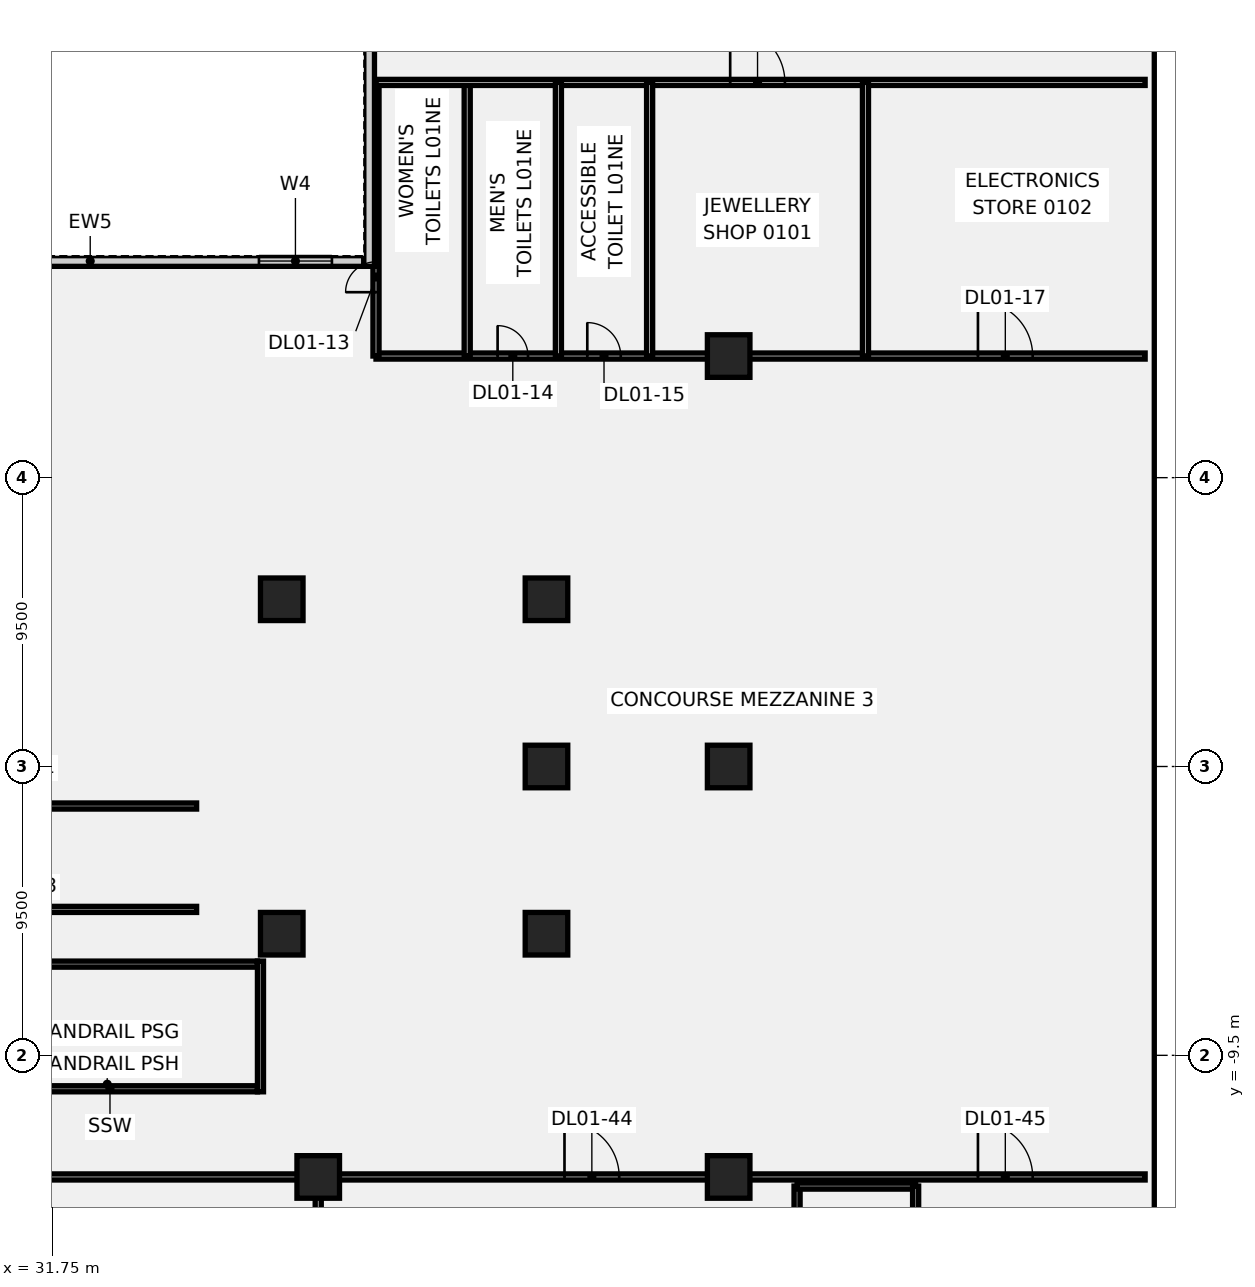
"""IFC4 building model, lengths in metres.
Left out: names, types, materials, properties, quantities, classifications, styles, units other than length and angle.
Written with IfcOpenShell. Run it as: python <this file> out.ifc"""

import sys

from ifc_helpers import new_model, si_unit, direction, frame, frame_2d, origin, origin_2d, place, context, subcontext, project, spatial, polyline, rectangle, outline, extrude, element, fill, save


model = new_model("IFC4")
c1 = context("Model", 3, precision=1e-05, world=origin(), true_north=direction((0.0, 1.0)))
c2 = subcontext(c1, "Body", "Model", "MODEL_VIEW")
j1 = project(units=[si_unit("LENGTHUNIT", "METRE"), si_unit("PLANEANGLEUNIT", "RADIAN")], contexts=[c1])
p1 = place(None, origin())
s1 = spatial("IfcSite", under=j1, at=p1, CompositionType="ELEMENT")
p2 = place(p1, origin())
s2 = spatial("IfcBuilding", under=s1, at=p2, CompositionType="ELEMENT")
p3 = place(p2, frame((0.0, 0.0, 9.0)))
s3 = spatial("IfcBuildingStorey", under=s2, at=p3, CompositionType="ELEMENT", Elevation=9.0)
for number, where, z_axis, x_axis in (
    (1, (39.3, 5.5, -0.5), (0.0, 0.0, 1.0), (1.0, 0.0, 0.0)),
    (2, (39.3, -5.5, -0.5), (0.0, 0.0, 1.0), (1.0, 0.0, 0.0)),
    (3, (48.008, -5.5, -0.5), (0.0, 0.0, 1.0), (1.0, 0.0, 0.0)),
    (4, (48.008, 0.0, -0.5), (0.0, 0.0, 1.0), (1.0, 0.0, 0.0)),
    (5, (48.008, 5.5, -0.5), (0.0, 0.0, 1.0), (1.0, 0.0, 0.0)),
    (6, (40.5, -13.5, -0.5), (0.0, 0.0, 1.0), (1.0, 0.0, 0.0)),
    (7, (54.0, -13.5, -0.5), (0.0, 0.0, 1.0), (1.0, 0.0, 0.0)),
    (8, (54.0, 0.0, -0.5), (0.0, 0.0, 1.0), (1.0, 0.0, 0.0)),
    (9, (54.0, 13.5, -0.5), (0.0, 0.0, 1.0), (1.0, 0.0, 0.0)),
):
    element("IfcColumn", number, at=place(p3, frame(where, z_axis=z_axis, x_axis=x_axis)), inside=s3, PredefinedType="COLUMN", context=c2, shape_type="SweptSolid", body=[
        extrude(rectangle(XDim=1.4, YDim=1.4, at=origin_2d()), origin(), (0.0, 0.0, 1.0), 6.0),
    ])
p4 = place(p3, frame((56.25, -25.3, 0.0), z_axis=(0.0, 0.0, 1.0), x_axis=(0.0, 1.0, 0.0)))
e10 = element("IfcWall", 10, at=p4, inside=s3, PredefinedType="PARTITIONING", context=c2, shape_type="SweptSolid", body=[
    extrude(rectangle(XDim=11.5, YDim=0.2, at=frame_2d((5.75, 0.0))), origin(), (0.0, 0.0, 1.0), 5.5),
])
p5 = place(p3, frame((56.25, -13.8, 0.0), z_axis=(0.0, 0.0, 1.0), x_axis=(1.0, 0.0, 0.0)))
e11 = element("IfcWall", 11, at=p5, inside=s3, PredefinedType="PARTITIONING", context=c2, shape_type="SweptSolid", body=[
    extrude(rectangle(XDim=3.9, YDim=0.2, at=frame_2d((1.95, 0.0))), origin(), (0.0, 0.0, 1.0), 5.5),
])
p6 = place(p3, frame((60.15, -25.3, 0.0), z_axis=(0.0, 0.0, 1.0), x_axis=(0.0, 1.0, 0.0)))
e12 = element("IfcWall", 12, at=p6, inside=s3, PredefinedType="PARTITIONING", context=c2, shape_type="SweptSolid", body=[
    extrude(rectangle(XDim=11.5, YDim=0.2, at=frame_2d((5.75, 0.0))), origin(), (0.0, 0.0, 1.0), 5.5),
])
p7 = place(p3, frame((40.5, -22.5, 0.0), z_axis=(0.0, 0.0, 1.0), x_axis=(0.0, 1.0, 0.0)))
e13 = element("IfcWall", 13, at=p7, inside=s3, PredefinedType="PARTITIONING", context=c2, shape_type="SweptSolid", body=[
    extrude(rectangle(XDim=9.0, YDim=0.2, at=frame_2d((4.5, 0.0))), origin(), (0.0, 0.0, 1.0), 5.5),
])
p8 = place(p3, frame((22.5, -13.5, 0.0), z_axis=(0.0, 0.0, 1.0), x_axis=(1.0, 0.0, 0.0)))
e14 = element("IfcWall", 14, at=p8, inside=s3, PredefinedType="PARTITIONING", context=c2, shape_type="SweptSolid", body=[
    extrude(rectangle(XDim=45.199, YDim=0.2, at=frame_2d((22.6, 0.0))), origin(), (0.0, 0.0, 1.0), 5.5),
])
p9 = place(p8, frame((26.1, 0.0, 0.0)))
e15 = element("IfcOpeningElement", 15, at=p9, cuts=e14, PredefinedType="OPENING", context=c2, shape_type="SweptSolid", body=[
    extrude(rectangle(XDim=1.8, YDim=2.1, at=frame_2d((0.9, 1.05))), frame((0.0, 0.11, 0.0), z_axis=(0.0, -1.0, 0.0), x_axis=(1.0, 0.0, 0.0)), (0.0, 0.0, 1.0), 0.22),
])
p10 = place(p8, frame((39.7, 0.0, 0.0)))
e16 = element("IfcOpeningElement", 16, at=p10, cuts=e14, PredefinedType="OPENING", context=c2, shape_type="SweptSolid", body=[
    extrude(rectangle(XDim=1.8, YDim=2.1, at=frame_2d((0.9, 1.05))), frame((0.0, 0.11, 0.0), z_axis=(0.0, -1.0, 0.0), x_axis=(1.0, 0.0, 0.0)), (0.0, 0.0, 1.0), 0.22),
])
p11 = place(p3, frame((42.4, 13.5, 0.0), z_axis=(0.0, 0.0, 1.0), x_axis=(1.0, 0.0, 0.0)))
e17 = element("IfcWall", 17, at=p11, inside=s3, PredefinedType="PARTITIONING", context=c2, shape_type="SweptSolid", body=[
    extrude(rectangle(XDim=25.299, YDim=0.2, at=frame_2d((12.649, 0.0))), origin(), (0.0, 0.0, 1.0), 5.5),
])
p12 = place(p11, frame((4.0, 0.0, 0.0)))
e18 = element("IfcOpeningElement", 18, at=p12, cuts=e17, PredefinedType="OPENING", context=c2, shape_type="SweptSolid", body=[
    extrude(rectangle(XDim=1.0, YDim=2.1, at=frame_2d((0.5, 1.05))), frame((0.0, 0.11, 0.0), z_axis=(0.0, -1.0, 0.0), x_axis=(1.0, 0.0, 0.0)), (0.0, 0.0, 1.0), 0.22),
])
p13 = place(p11, frame((6.95, 0.0, 0.0)))
e19 = element("IfcOpeningElement", 19, at=p13, cuts=e17, PredefinedType="OPENING", context=c2, shape_type="SweptSolid", body=[
    extrude(rectangle(XDim=1.1, YDim=2.1, at=frame_2d((0.55, 1.05))), frame((0.0, 0.11, 0.0), z_axis=(0.0, -1.0, 0.0), x_axis=(1.0, 0.0, 0.0)), (0.0, 0.0, 1.0), 0.22),
])
p14 = place(p11, frame((19.8, 0.0, 0.0)))
e20 = element("IfcOpeningElement", 20, at=p14, cuts=e17, PredefinedType="OPENING", context=c2, shape_type="SweptSolid", body=[
    extrude(rectangle(XDim=1.8, YDim=2.1, at=frame_2d((0.9, 1.05))), frame((0.0, 0.11, 0.0), z_axis=(0.0, -1.0, 0.0), x_axis=(1.0, 0.0, 0.0)), (0.0, 0.0, 1.0), 0.22),
])
p15 = place(p3, frame((45.4, 13.5, 0.0), z_axis=(0.0, 0.0, 1.0), x_axis=(0.0, 1.0, 0.0)))
e21 = element("IfcWall", 21, at=p15, inside=s3, PredefinedType="PARTITIONING", context=c2, shape_type="SweptSolid", body=[
    extrude(rectangle(XDim=9.0, YDim=0.2, at=frame_2d((4.5, 0.0))), origin(), (0.0, 0.0, 1.0), 5.5),
])
p16 = place(p3, frame((42.4, 13.5, 0.0), z_axis=(0.0, 0.0, 1.0), x_axis=(0.0, 1.0, 0.0)))
e22 = element("IfcWall", 22, at=p16, inside=s3, PredefinedType="PARTITIONING", context=c2, shape_type="SweptSolid", body=[
    extrude(rectangle(XDim=9.0, YDim=0.2, at=frame_2d((4.5, 0.0))), origin(), (0.0, 0.0, 1.0), 5.5),
])
p17 = place(p16, frame((2.1, 0.0, 0.0)))
e23 = element("IfcOpeningElement", 23, at=p17, cuts=e22, PredefinedType="OPENING", context=c2, shape_type="SweptSolid", body=[
    extrude(rectangle(XDim=1.0, YDim=2.1, at=frame_2d((0.5, 1.05))), frame((0.0, 0.11, 0.0), z_axis=(0.0, -1.0, 0.0), x_axis=(1.0, 0.0, 0.0)), (0.0, 0.0, 1.0), 0.22),
])
p18 = place(p3, frame((42.4, 22.5, 0.0), z_axis=(0.0, 0.0, 1.0), x_axis=(1.0, 0.0, 0.0)))
e24 = element("IfcWall", 24, at=p18, inside=s3, PredefinedType="PARTITIONING", context=c2, shape_type="SweptSolid", body=[
    extrude(rectangle(XDim=25.299, YDim=0.2, at=frame_2d((12.649, 0.0))), origin(), (0.0, 0.0, 1.0), 5.5),
])
p19 = place(p18, frame((11.65, 0.0, 0.0)))
e25 = element("IfcOpeningElement", 25, at=p19, cuts=e24, PredefinedType="OPENING", context=c2, shape_type="SweptSolid", body=[
    extrude(rectangle(XDim=1.8, YDim=2.1, at=frame_2d((0.9, 1.05))), frame((0.0, 0.11, 0.0), z_axis=(0.0, -1.0, 0.0), x_axis=(1.0, 0.0, 0.0)), (0.0, 0.0, 1.0), 0.22),
])
for number, where, z_axis, x_axis in (
    (26, (48.4, 13.5, 0.0), (0.0, 0.0, 1.0), (0.0, 1.0, 0.0)),
    (27, (51.4, 13.5, 0.0), (0.0, 0.0, 1.0), (0.0, 1.0, 0.0)),
    (28, (58.5, 13.5, 0.0), (0.0, 0.0, 1.0), (0.0, 1.0, 0.0)),
):
    element("IfcWall", number, at=place(p3, frame(where, z_axis=z_axis, x_axis=x_axis)), inside=s3, PredefinedType="PARTITIONING", context=c2, shape_type="SweptSolid", body=[
        extrude(rectangle(XDim=9.0, YDim=0.2, at=frame_2d((4.5, 0.0))), origin(), (0.0, 0.0, 1.0), 5.5),
    ])
for number, where, z_axis, x_axis in (
    (29, (28.8, -10.6, 0.0), (0.0, 0.0, 1.0), (1.0, 0.0, 0.0)),
    (30, (28.8, -6.5, 0.0), (0.0, 0.0, 1.0), (1.0, 0.0, 0.0)),
):
    element("IfcWall", number, at=place(p3, frame(where, z_axis=z_axis, x_axis=x_axis)), inside=s3, PredefinedType="SOLIDWALL", context=c2, shape_type="SweptSolid", body=[
        extrude(rectangle(XDim=9.7, YDim=0.2, at=frame_2d((4.85, 0.0))), origin(), (0.0, 0.0, 1.0), 5.5),
    ])
p20 = place(p3, frame((38.6, -10.7, 0.0), z_axis=(0.0, 0.0, 1.0), x_axis=(0.0, 1.0, 0.0)))
e31 = element("IfcWall", 31, at=p20, inside=s3, PredefinedType="SOLIDWALL", context=c2, shape_type="SweptSolid", body=[
    extrude(rectangle(XDim=4.3, YDim=0.2, at=frame_2d((2.15, 0.0))), origin(), (0.0, 0.0, 1.0), 5.5),
])
p21 = place(p3, frame((24.0, 16.625, 0.0), z_axis=(0.0, 0.0, 1.0), x_axis=(1.0, 0.0, 0.0)))
e32 = element("IfcWall", 32, at=p21, inside=s3, PredefinedType="SOLIDWALL", context=c2, shape_type="SweptSolid", body=[
    extrude(rectangle(XDim=18.0, YDim=0.35, at=frame_2d((9.0, 0.0))), origin(), (0.0, 0.0, 1.0), 5.5),
])
p22 = place(p21, frame((14.55, 0.0, 1.0)))
e33 = element("IfcOpeningElement", 33, at=p22, cuts=e32, PredefinedType="OPENING", context=c2, shape_type="SweptSolid", body=[
    extrude(rectangle(XDim=2.4, YDim=1.8, at=frame_2d((1.2, 0.9))), frame((0.0, 0.185, 0.0), z_axis=(0.0, -1.0, 0.0), x_axis=(1.0, 0.0, 0.0)), (0.0, 0.0, 1.0), 0.37),
])
p23 = place(p3, frame((42.175, 16.45, 0.0), z_axis=(0.0, 0.0, 1.0), x_axis=(0.0, 1.0, 0.0)))
e34 = element("IfcWall", 34, at=p23, inside=s3, PredefinedType="SOLIDWALL", context=c2, shape_type="SweptSolid", body=[
    extrude(rectangle(XDim=27.4, YDim=0.35, at=frame_2d((13.7, 0.0))), origin(), (0.0, 0.0, 1.0), 5.5),
])
p24 = place(p23, frame((15.2, 0.0, 1.0)))
e35 = element("IfcOpeningElement", 35, at=p24, cuts=e34, PredefinedType="OPENING", context=c2, shape_type="SweptSolid", body=[
    extrude(rectangle(XDim=2.4, YDim=1.8, at=frame_2d((1.2, 0.9))), frame((0.0, 0.185, 0.0), z_axis=(0.0, -1.0, 0.0), x_axis=(1.0, 0.0, 0.0)), (0.0, 0.0, 1.0), 0.37),
])
p25 = place(p3, frame((29.8, -1.3, 0.0), z_axis=(0.0, 0.0, 1.0), x_axis=(1.0, 0.0, 0.0)))
e36 = element("IfcWall", 36, at=p25, inside=s3, PredefinedType="SHEAR", context=c2, shape_type="SweptSolid", body=[
    extrude(rectangle(XDim=6.7, YDim=0.2, at=frame_2d((3.35, 0.0))), origin(), (0.0, 0.0, 1.0), 5.5),
])
p26 = place(p25, frame((0.35, 0.0, 0.0)))
e37 = element("IfcOpeningElement", 37, at=p26, cuts=e36, PredefinedType="OPENING", context=c2, shape_type="SweptSolid", body=[
    extrude(rectangle(XDim=1.0, YDim=2.1, at=frame_2d((0.5, 1.05))), frame((0.0, 0.11, 0.0), z_axis=(0.0, -1.0, 0.0), x_axis=(1.0, 0.0, 0.0)), (0.0, 0.0, 1.0), 0.22),
])
p27 = place(p3, frame((29.8, -4.7, 0.0), z_axis=(0.0, 0.0, 1.0), x_axis=(1.0, 0.0, 0.0)))
e38 = element("IfcWall", 38, at=p27, inside=s3, PredefinedType="SHEAR", context=c2, shape_type="SweptSolid", body=[
    extrude(rectangle(XDim=6.7, YDim=0.2, at=frame_2d((3.35, 0.0))), origin(), (0.0, 0.0, 1.0), 5.5),
])
p28 = place(p3, origin())
e39 = element("IfcWall", 39, at=p28, inside=s3, PredefinedType="SHEAR", context=c2, shape_type="SweptSolid", body=[
    extrude(outline(polyline([(36.3, -4.6), (36.5, -4.6), (36.5, -1.4), (36.3, -1.4), (36.3, -4.6)])), origin(), (0.0, 0.0, 1.0), 5.5),
])
p29 = place(p17, origin())
e40 = element("IfcDoor", 40, at=p29, inside=s3, OperationType="SINGLE_SWING_LEFT", PredefinedType="DOOR", context=c2, shape_type="SweptSolid", body=[
    extrude(rectangle(XDim=1.0, YDim=2.1, at=frame_2d((0.5, 1.05))), frame((0.0, 0.025, 0.0), z_axis=(0.0, -1.0, 0.0), x_axis=(1.0, 0.0, 0.0)), (0.0, 0.0, 1.0), 0.05),
])
fill(e23, e40)
p30 = place(p12, origin())
e41 = element("IfcDoor", 41, at=p30, inside=s3, OperationType="SINGLE_SWING_RIGHT", PredefinedType="DOOR", context=c2, shape_type="SweptSolid", body=[
    extrude(rectangle(XDim=1.0, YDim=2.1, at=frame_2d((0.5, 1.05))), frame((0.0, 0.025, 0.0), z_axis=(0.0, -1.0, 0.0), x_axis=(1.0, 0.0, 0.0)), (0.0, 0.0, 1.0), 0.05),
])
fill(e18, e41)
p31 = place(p13, origin())
e42 = element("IfcDoor", 42, at=p31, inside=s3, OperationType="SINGLE_SWING_LEFT", PredefinedType="DOOR", context=c2, shape_type="SweptSolid", body=[
    extrude(rectangle(XDim=1.1, YDim=2.1, at=frame_2d((0.55, 1.05))), frame((0.0, 0.025, 0.0), z_axis=(0.0, -1.0, 0.0), x_axis=(1.0, 0.0, 0.0)), (0.0, 0.0, 1.0), 0.05),
])
fill(e19, e42)
p32 = place(p19, origin())
e43 = element("IfcDoor", 43, at=p32, inside=s3, OperationType="SINGLE_SWING_RIGHT", PredefinedType="DOOR", context=c2, shape_type="SweptSolid", body=[
    extrude(rectangle(XDim=1.8, YDim=2.1, at=frame_2d((0.9, 1.05))), frame((0.0, 0.025, 0.0), z_axis=(0.0, -1.0, 0.0), x_axis=(1.0, 0.0, 0.0)), (0.0, 0.0, 1.0), 0.05),
])
fill(e25, e43)
p33 = place(p14, origin())
e44 = element("IfcDoor", 44, at=p33, inside=s3, OperationType="SINGLE_SWING_LEFT", PredefinedType="DOOR", context=c2, shape_type="SweptSolid", body=[
    extrude(rectangle(XDim=1.8, YDim=2.1, at=frame_2d((0.9, 1.05))), frame((0.0, 0.025, 0.0), z_axis=(0.0, -1.0, 0.0), x_axis=(1.0, 0.0, 0.0)), (0.0, 0.0, 1.0), 0.05),
])
fill(e20, e44)
p34 = place(p9, origin())
e45 = element("IfcDoor", 45, at=p34, inside=s3, OperationType="SINGLE_SWING_RIGHT", PredefinedType="DOOR", context=c2, shape_type="SweptSolid", body=[
    extrude(rectangle(XDim=1.8, YDim=2.1, at=frame_2d((0.9, 1.05))), frame((0.0, 0.025, 0.0), z_axis=(0.0, -1.0, 0.0), x_axis=(1.0, 0.0, 0.0)), (0.0, 0.0, 1.0), 0.05),
])
fill(e15, e45)
p35 = place(p10, origin())
e46 = element("IfcDoor", 46, at=p35, inside=s3, OperationType="SINGLE_SWING_LEFT", PredefinedType="DOOR", context=c2, shape_type="SweptSolid", body=[
    extrude(rectangle(XDim=1.8, YDim=2.1, at=frame_2d((0.9, 1.05))), frame((0.0, 0.025, 0.0), z_axis=(0.0, -1.0, 0.0), x_axis=(1.0, 0.0, 0.0)), (0.0, 0.0, 1.0), 0.05),
])
fill(e16, e46)
p36 = place(p22, origin())
e47 = element("IfcWindow", 47, at=p36, inside=s3, PartitioningType="SINGLE_PANEL", PredefinedType="WINDOW", context=c2, shape_type="SweptSolid", body=[
    extrude(rectangle(XDim=2.4, YDim=1.8, at=frame_2d((1.2, 0.9))), frame((0.0, 0.03, 0.0), z_axis=(0.0, -1.0, 0.0), x_axis=(1.0, 0.0, 0.0)), (0.0, 0.0, 1.0), 0.06),
])
fill(e33, e47)
save(model, sys.argv[1])
